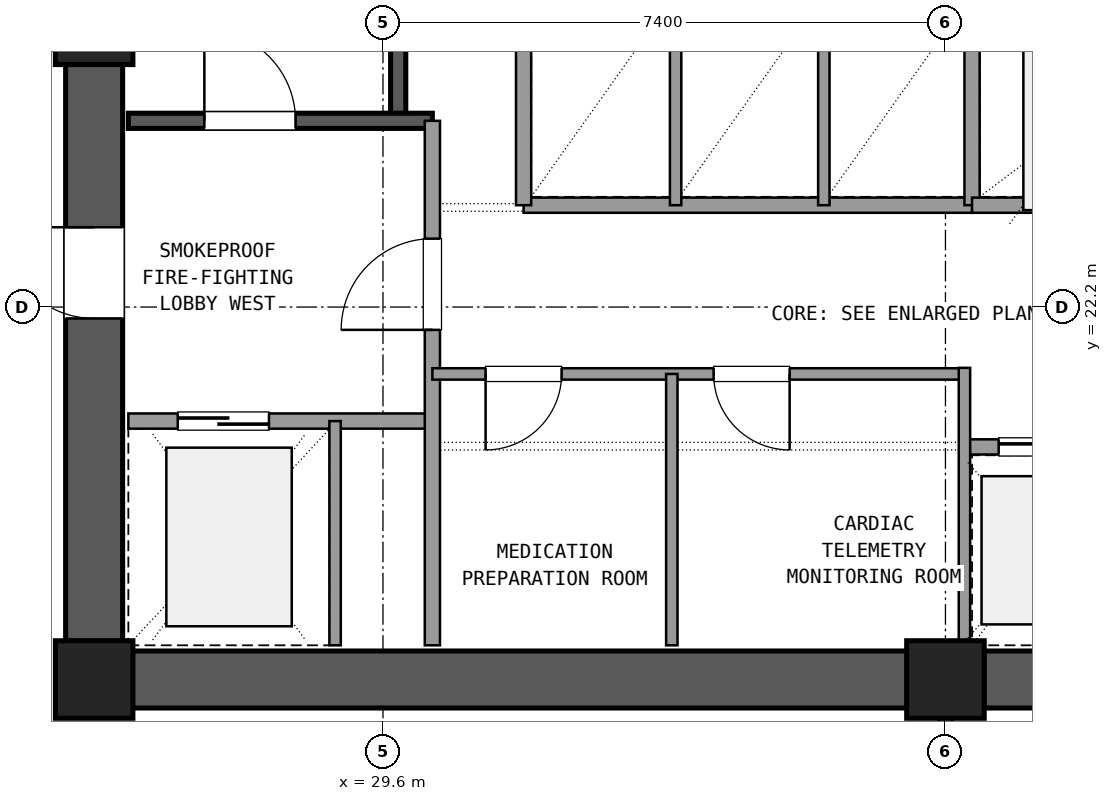
"""IFC4 building model, lengths in metres.
Left out: names, types, materials, properties, quantities, classifications, styles, units other than length and angle.
Written with IfcOpenShell. Run it as: python <this file> out.ifc"""

import sys

from ifc_helpers import new_model, si_unit, direction, frame, frame_2d, origin, origin_2d, place, context, subcontext, project, spatial, rectangle, extrude, element, fill, save


model = new_model("IFC4")
c1 = context("Model", 3, precision=1e-05, world=origin(), true_north=direction((0.0, 1.0)))
c2 = subcontext(c1, "Body", "Model", "MODEL_VIEW")
j1 = project(units=[si_unit("LENGTHUNIT", "METRE"), si_unit("PLANEANGLEUNIT", "RADIAN")], contexts=[c1])
p1 = place(None, origin())
s1 = spatial("IfcSite", under=j1, at=p1, CompositionType="ELEMENT")
p2 = place(p1, origin())
s2 = spatial("IfcBuilding", under=s1, at=p2, CompositionType="ELEMENT")
p3 = place(p2, frame((0.0, 0.0, 134.82)))
s3 = spatial("IfcBuildingStorey", under=s2, at=p3, CompositionType="ELEMENT", Elevation=134.82)
for number, where, z_axis, x_axis in (
    (1, (25.8, 17.3, 0.0), (0.0, 0.0, 1.0), (1.0, 0.0, 0.0)),
    (2, (37.0, 17.3, 0.0), (0.0, 0.0, 1.0), (1.0, 0.0, 0.0)),
    (3, (25.8, 25.9, 0.0), (0.0, 0.0, 1.0), (1.0, 0.0, 0.0)),
):
    element("IfcColumn", number, at=place(p3, frame(where, z_axis=z_axis, x_axis=x_axis)), inside=s3, PredefinedType="COLUMN", context=c2, shape_type="SweptSolid", body=[
        extrude(rectangle(XDim=1.02, YDim=1.02, at=origin_2d()), origin(), (0.0, 0.0, 1.0), 3.6),
    ])
for number, where, z_axis, x_axis in (
    (4, (26.305, 17.3, 0.0), (0.0, 0.0, 1.0), (1.0, 0.0, 0.0)),
    (5, (37.505, 17.3, 0.0), (0.0, 0.0, 1.0), (1.0, 0.0, 0.0)),
):
    element("IfcWall", number, at=place(p3, frame(where, z_axis=z_axis, x_axis=x_axis)), inside=s3, PredefinedType="SHEAR", context=c2, shape_type="SweptSolid", body=[
        extrude(rectangle(XDim=10.19, YDim=0.75, at=frame_2d((5.095, 0.0))), origin(), (0.0, 0.0, 1.0), 3.32),
    ])
p4 = place(p3, frame((25.8, 25.395, 0.0), z_axis=(0.0, 0.0, 1.0), x_axis=(0.0, -1.0, 0.0)))
e6 = element("IfcWall", 6, at=p4, inside=s3, PredefinedType="SHEAR", context=c2, shape_type="SweptSolid", body=[
    extrude(rectangle(XDim=7.59, YDim=0.75, at=frame_2d((3.795, 0.0))), origin(), (0.0, 0.0, 1.0), 3.32),
])
p5 = place(p4, frame((2.145, 0.0, 0.0)))
e7 = element("IfcOpeningElement", 7, at=p5, cuts=e6, PredefinedType="OPENING", context=c2, shape_type="SweptSolid", body=[
    extrude(rectangle(XDim=1.2, YDim=2.15, at=frame_2d((0.6, 1.075))), frame((0.0, 0.385, 0.0), z_axis=(0.0, -1.0, 0.0), x_axis=(1.0, 0.0, 0.0)), (0.0, 0.0, 1.0), 0.77),
])
p6 = place(p3, frame((29.8, 24.65, 0.0), z_axis=(0.0, 0.0, 1.0), x_axis=(0.0, 1.0, 0.0)))
e8 = element("IfcWall", 8, at=p6, inside=s3, PredefinedType="SHEAR", context=c2, shape_type="SweptSolid", body=[
    extrude(rectangle(XDim=9.4, YDim=0.2, at=frame_2d((4.7, 0.0))), origin(), (0.0, 0.0, 1.0), 3.32),
])
p7 = place(p3, frame((26.25, 24.65, 0.0), z_axis=(0.0, 0.0, 1.0), x_axis=(1.0, 0.0, 0.0)))
e9 = element("IfcWall", 9, at=p7, inside=s3, PredefinedType="SHEAR", context=c2, shape_type="SweptSolid", body=[
    extrude(rectangle(XDim=4.0, YDim=0.2, at=frame_2d((2.0, 0.0))), origin(), (0.0, 0.0, 1.0), 3.32),
])
p8 = place(p7, frame((1.0, 0.0, 0.0)))
e10 = element("IfcOpeningElement", 10, at=p8, cuts=e9, PredefinedType="OPENING", context=c2, shape_type="SweptSolid", body=[
    extrude(rectangle(XDim=1.2, YDim=2.15, at=frame_2d((0.6, 1.075))), frame((0.0, 0.11, 0.0), z_axis=(0.0, -1.0, 0.0), x_axis=(1.0, 0.0, 0.0)), (0.0, 0.0, 1.0), 0.22),
])
p9 = place(p3, frame((26.25, 20.7, 0.0), z_axis=(0.0, 0.0, 1.0), x_axis=(1.0, 0.0, 0.0)))
e11 = element("IfcWall", 11, at=p9, inside=s3, PredefinedType="SOLIDWALL", context=c2, shape_type="SweptSolid", body=[
    extrude(rectangle(XDim=4.0, YDim=0.2, at=frame_2d((2.0, 0.0))), origin(), (0.0, 0.0, 1.0), 2.61),
])
p10 = place(p9, frame((0.65, 0.0, 0.0)))
e12 = element("IfcOpeningElement", 12, at=p10, cuts=e11, PredefinedType="OPENING", context=c2, shape_type="SweptSolid", body=[
    extrude(rectangle(XDim=1.2, YDim=2.15, at=frame_2d((0.6, 1.075))), frame((0.0, 0.11, 0.0), z_axis=(0.0, -1.0, 0.0), x_axis=(1.0, 0.0, 0.0)), (0.0, 0.0, 1.0), 0.22),
])
p11 = place(p3, frame((30.25, 17.75, 0.0), z_axis=(0.0, 0.0, 1.0), x_axis=(0.0, 1.0, 0.0)))
e13 = element("IfcWall", 13, at=p11, inside=s3, PredefinedType="SOLIDWALL", context=c2, shape_type="SweptSolid", body=[
    extrude(rectangle(XDim=6.9, YDim=0.2, at=frame_2d((3.45, 0.0))), origin(), (0.0, 0.0, 1.0), 2.61),
])
p12 = place(p11, frame((4.15, 0.0, 0.0)))
e14 = element("IfcOpeningElement", 14, at=p12, cuts=e13, PredefinedType="OPENING", context=c2, shape_type="SweptSolid", body=[
    extrude(rectangle(XDim=1.2, YDim=2.15, at=frame_2d((0.6, 1.075))), frame((0.0, 0.11, 0.0), z_axis=(0.0, -1.0, 0.0), x_axis=(1.0, 0.0, 0.0)), (0.0, 0.0, 1.0), 0.22),
])
p13 = place(p3, frame((28.97, 17.75, 0.0), z_axis=(0.0, 0.0, 1.0), x_axis=(0.0, 1.0, 0.0)))
e15 = element("IfcWall", 15, at=p13, inside=s3, PredefinedType="PARTITIONING", context=c2, shape_type="SweptSolid", body=[
    extrude(rectangle(XDim=2.95, YDim=0.15, at=frame_2d((1.475, 0.0))), origin(), (0.0, 0.0, 1.0), 2.61),
])
p14 = place(p3, frame((30.25, 21.32, 0.0), z_axis=(0.0, 0.0, 1.0), x_axis=(1.0, 0.0, 0.0)))
e16 = element("IfcWall", 16, at=p14, inside=s3, PredefinedType="PARTITIONING", context=c2, shape_type="SweptSolid", body=[
    extrude(rectangle(XDim=7.0, YDim=0.15, at=frame_2d((3.5, 0.0))), origin(), (0.0, 0.0, 1.0), 2.61),
])
p15 = place(p14, frame((0.7, 0.0, 0.0)))
e17 = element("IfcOpeningElement", 17, at=p15, cuts=e16, PredefinedType="OPENING", context=c2, shape_type="SweptSolid", body=[
    extrude(rectangle(XDim=1.0, YDim=2.15, at=frame_2d((0.5, 1.075))), frame((0.0, 0.085, 0.0), z_axis=(0.0, -1.0, 0.0), x_axis=(1.0, 0.0, 0.0)), (0.0, 0.0, 1.0), 0.17),
])
p16 = place(p14, frame((3.7, 0.0, 0.0)))
e18 = element("IfcOpeningElement", 18, at=p16, cuts=e16, PredefinedType="OPENING", context=c2, shape_type="SweptSolid", body=[
    extrude(rectangle(XDim=1.0, YDim=2.15, at=frame_2d((0.5, 1.075))), frame((0.0, 0.085, 0.0), z_axis=(0.0, -1.0, 0.0), x_axis=(1.0, 0.0, 0.0)), (0.0, 0.0, 1.0), 0.17),
])
p17 = place(p3, frame((33.4, 17.75, 0.0), z_axis=(0.0, 0.0, 1.0), x_axis=(0.0, 1.0, 0.0)))
e19 = element("IfcWall", 19, at=p17, inside=s3, PredefinedType="PARTITIONING", context=c2, shape_type="SweptSolid", body=[
    extrude(rectangle(XDim=3.57, YDim=0.15, at=frame_2d((1.785, 0.0))), origin(), (0.0, 0.0, 1.0), 2.61),
])
p18 = place(p3, frame((37.25, 20.36, 0.0), z_axis=(0.0, 0.0, 1.0), x_axis=(1.0, 0.0, 0.0)))
e20 = element("IfcWall", 20, at=p18, inside=s3, PredefinedType="SOLIDWALL", context=c2, shape_type="SweptSolid", body=[
    extrude(rectangle(XDim=6.1, YDim=0.2, at=frame_2d((3.05, 0.0))), origin(), (0.0, 0.0, 1.0), 2.61),
])
p19 = place(p18, frame((0.45, 0.0, 0.0)))
e21 = element("IfcOpeningElement", 21, at=p19, cuts=e20, PredefinedType="OPENING", context=c2, shape_type="SweptSolid", body=[
    extrude(rectangle(XDim=1.1, YDim=2.15, at=frame_2d((0.55, 1.075))), frame((0.0, 0.11, 0.0), z_axis=(0.0, -1.0, 0.0), x_axis=(1.0, 0.0, 0.0)), (0.0, 0.0, 1.0), 0.22),
])
p20 = place(p18, frame((2.5, 0.0, 0.0)))
e22 = element("IfcOpeningElement", 22, at=p20, cuts=e20, PredefinedType="OPENING", context=c2, shape_type="SweptSolid", body=[
    extrude(rectangle(XDim=1.1, YDim=2.15, at=frame_2d((0.55, 1.075))), frame((0.0, 0.11, 0.0), z_axis=(0.0, -1.0, 0.0), x_axis=(1.0, 0.0, 0.0)), (0.0, 0.0, 1.0), 0.22),
])
p21 = place(p18, frame((4.55, 0.0, 0.0)))
e23 = element("IfcOpeningElement", 23, at=p21, cuts=e20, PredefinedType="OPENING", context=c2, shape_type="SweptSolid", body=[
    extrude(rectangle(XDim=1.1, YDim=2.15, at=frame_2d((0.55, 1.075))), frame((0.0, 0.11, 0.0), z_axis=(0.0, -1.0, 0.0), x_axis=(1.0, 0.0, 0.0)), (0.0, 0.0, 1.0), 0.22),
])
p22 = place(p3, frame((37.25, 17.75, 0.0), z_axis=(0.0, 0.0, 1.0), x_axis=(0.0, 1.0, 0.0)))
e24 = element("IfcWall", 24, at=p22, inside=s3, PredefinedType="PARTITIONING", context=c2, shape_type="SweptSolid", body=[
    extrude(rectangle(XDim=3.65, YDim=0.15, at=frame_2d((1.825, 0.0))), origin(), (0.0, 0.0, 1.0), 2.61),
])
p23 = place(p3, frame((31.45, 23.54, 0.0), z_axis=(0.0, 0.0, 1.0), x_axis=(1.0, 0.0, 0.0)))
e25 = element("IfcWall", 25, at=p23, inside=s3, PredefinedType="SOLIDWALL", context=c2, shape_type="SweptSolid", body=[
    extrude(rectangle(XDim=5.9, YDim=0.2, at=frame_2d((2.95, 0.0))), origin(), (0.0, 0.0, 1.0), 2.61),
])
p24 = place(p3, frame((31.45, 23.54, 0.0), z_axis=(0.0, 0.0, 1.0), x_axis=(0.0, 1.0, 0.0)))
e26 = element("IfcWall", 26, at=p24, inside=s3, PredefinedType="SOLIDWALL", context=c2, shape_type="SweptSolid", body=[
    extrude(rectangle(XDim=2.81, YDim=0.2, at=frame_2d((1.405, 0.0))), origin(), (0.0, 0.0, 1.0), 2.61),
])
for number, where, z_axis, x_axis in (
    (27, (33.45, 23.54, 0.0), (0.0, 0.0, 1.0), (0.0, 1.0, 0.0)),
    (28, (35.4, 23.54, 0.0), (0.0, 0.0, 1.0), (0.0, 1.0, 0.0)),
):
    element("IfcWall", number, at=place(p3, frame(where, z_axis=z_axis, x_axis=x_axis)), inside=s3, PredefinedType="PARTITIONING", context=c2, shape_type="SweptSolid", body=[
        extrude(rectangle(XDim=2.81, YDim=0.15, at=frame_2d((1.405, 0.0))), origin(), (0.0, 0.0, 1.0), 2.61),
    ])
p25 = place(p3, frame((37.35, 23.54, 0.0), z_axis=(0.0, 0.0, 1.0), x_axis=(0.0, 1.0, 0.0)))
e29 = element("IfcWall", 29, at=p25, inside=s3, PredefinedType="SOLIDWALL", context=c2, shape_type="SweptSolid", body=[
    extrude(rectangle(XDim=6.82, YDim=0.2, at=frame_2d((3.41, 0.0))), origin(), (0.0, 0.0, 1.0), 2.61),
])
p26 = place(p3, frame((37.35, 23.54, 0.0), z_axis=(0.0, 0.0, 1.0), x_axis=(1.0, 0.0, 0.0)))
e30 = element("IfcWall", 30, at=p26, inside=s3, PredefinedType="SOLIDWALL", context=c2, shape_type="SweptSolid", body=[
    extrude(rectangle(XDim=3.05, YDim=0.2, at=frame_2d((1.525, 0.0))), origin(), (0.0, 0.0, 1.0), 2.61),
])
p27 = place(p3, frame((37.0, 13.64, 0.0), z_axis=(0.0, 0.0, 1.0), x_axis=(0.0, 1.0, 0.0)))
e31 = element("IfcWall", 31, at=p27, inside=s3, PredefinedType="PARTITIONING", context=c2, shape_type="SweptSolid", body=[
    extrude(rectangle(XDim=3.21, YDim=0.18, at=frame_2d((1.605, 0.0))), origin(), (0.0, 0.0, 1.0), 2.61),
])
p28 = place(p27, frame((0.605, 0.0, 0.0)))
e32 = element("IfcOpeningElement", 32, at=p28, cuts=e31, PredefinedType="OPENING", context=c2, shape_type="SweptSolid", body=[
    extrude(rectangle(XDim=2.0, YDim=2.2, at=frame_2d((1.0, 1.1))), frame((0.0, 0.1, 0.0), z_axis=(0.0, -1.0, 0.0), x_axis=(1.0, 0.0, 0.0)), (0.0, 0.0, 1.0), 0.2),
])
p29 = place(p8, origin())
e33 = element("IfcDoor", 33, at=p29, inside=s3, OperationType="SINGLE_SWING_LEFT", PredefinedType="DOOR", context=c2, shape_type="SweptSolid", body=[
    extrude(rectangle(XDim=1.2, YDim=2.15, at=frame_2d((0.6, 1.075))), frame((0.0, 0.025, 0.0), z_axis=(0.0, -1.0, 0.0), x_axis=(1.0, 0.0, 0.0)), (0.0, 0.0, 1.0), 0.05),
])
fill(e10, e33)
p30 = place(p10, origin())
e34 = element("IfcDoor", 34, at=p30, inside=s3, OperationType="SLIDING_TO_LEFT", PredefinedType="DOOR", context=c2, shape_type="SweptSolid", body=[
    extrude(rectangle(XDim=1.2, YDim=2.15, at=frame_2d((0.6, 1.075))), frame((0.0, 0.025, 0.0), z_axis=(0.0, -1.0, 0.0), x_axis=(1.0, 0.0, 0.0)), (0.0, 0.0, 1.0), 0.05),
])
fill(e12, e34)
p31 = place(p12, origin())
e35 = element("IfcDoor", 35, at=p31, inside=s3, OperationType="SINGLE_SWING_LEFT", PredefinedType="DOOR", context=c2, shape_type="SweptSolid", body=[
    extrude(rectangle(XDim=1.2, YDim=2.15, at=frame_2d((0.6, 1.075))), frame((0.0, 0.025, 0.0), z_axis=(0.0, -1.0, 0.0), x_axis=(1.0, 0.0, 0.0)), (0.0, 0.0, 1.0), 0.05),
])
fill(e14, e35)
p32 = place(p5, frame((1.2, 0.0, 0.0), z_axis=(0.0, 0.0, 1.0), x_axis=(-1.0, 0.0, 0.0)))
e36 = element("IfcDoor", 36, at=p32, inside=s3, OperationType="SINGLE_SWING_LEFT", PredefinedType="DOOR", context=c2, shape_type="SweptSolid", body=[
    extrude(rectangle(XDim=1.2, YDim=2.15, at=frame_2d((0.6, 1.075))), frame((0.0, 0.025, 0.0), z_axis=(0.0, -1.0, 0.0), x_axis=(1.0, 0.0, 0.0)), (0.0, 0.0, 1.0), 0.05),
])
fill(e7, e36)
p33 = place(p15, frame((1.0, 0.0, 0.0), z_axis=(0.0, 0.0, 1.0), x_axis=(-1.0, 0.0, 0.0)))
e37 = element("IfcDoor", 37, at=p33, inside=s3, OperationType="SINGLE_SWING_LEFT", PredefinedType="DOOR", context=c2, shape_type="SweptSolid", body=[
    extrude(rectangle(XDim=1.0, YDim=2.15, at=frame_2d((0.5, 1.075))), frame((0.0, 0.025, 0.0), z_axis=(0.0, -1.0, 0.0), x_axis=(1.0, 0.0, 0.0)), (0.0, 0.0, 1.0), 0.05),
])
fill(e17, e37)
p34 = place(p16, frame((1.0, 0.0, 0.0), z_axis=(0.0, 0.0, 1.0), x_axis=(-1.0, 0.0, 0.0)))
e38 = element("IfcDoor", 38, at=p34, inside=s3, OperationType="SINGLE_SWING_RIGHT", PredefinedType="DOOR", context=c2, shape_type="SweptSolid", body=[
    extrude(rectangle(XDim=1.0, YDim=2.15, at=frame_2d((0.5, 1.075))), frame((0.0, 0.025, 0.0), z_axis=(0.0, -1.0, 0.0), x_axis=(1.0, 0.0, 0.0)), (0.0, 0.0, 1.0), 0.05),
])
fill(e18, e38)
p35 = place(p19, origin())
e39 = element("IfcDoor", 39, at=p35, inside=s3, OperationType="SLIDING_TO_LEFT", PredefinedType="DOOR", context=c2, shape_type="SweptSolid", body=[
    extrude(rectangle(XDim=1.1, YDim=2.15, at=frame_2d((0.55, 1.075))), frame((0.0, 0.025, 0.0), z_axis=(0.0, -1.0, 0.0), x_axis=(1.0, 0.0, 0.0)), (0.0, 0.0, 1.0), 0.05),
])
fill(e21, e39)
save(model, sys.argv[1])
